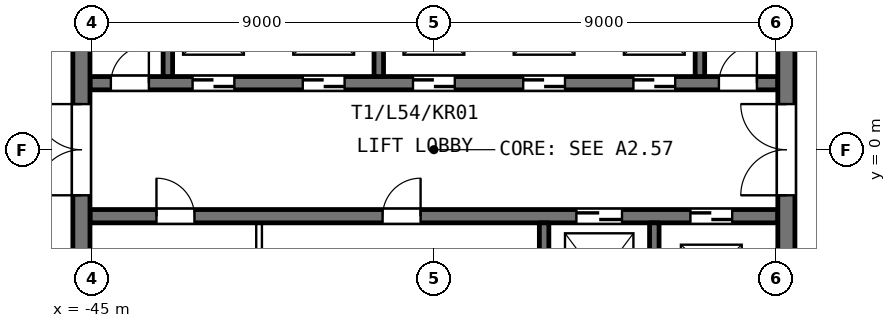
"""IFC4 building model, lengths in metres.
Left out: names, types, materials, properties, quantities, classifications, styles, units other than length and angle.
Written with IfcOpenShell. Run it as: python <this file> out.ifc"""

import sys

from ifc_helpers import new_model, si_unit, direction, frame, frame_2d, origin, place, context, subcontext, project, spatial, rectangle, extrude, element, fill, save


model = new_model("IFC4")
c1 = context("Model", 3, precision=1e-05, world=origin(), true_north=direction((0.0, 1.0)))
c2 = subcontext(c1, "Body", "Model", "MODEL_VIEW")
j1 = project(units=[si_unit("LENGTHUNIT", "METRE"), si_unit("PLANEANGLEUNIT", "RADIAN")], contexts=[c1])
p1 = place(None, origin())
s1 = spatial("IfcSite", under=j1, at=p1, CompositionType="ELEMENT")
p2 = place(p1, origin())
s2 = spatial("IfcBuilding", under=s1, at=p2, CompositionType="ELEMENT")
p3 = place(p2, frame((0.0, 0.0, 228.9)))
s3 = spatial("IfcBuildingStorey", under=s2, at=p3, CompositionType="ELEMENT", Elevation=228.9)
p4 = place(p3, frame((-45.05, -1.75, 0.0), z_axis=(0.0, 0.0, 1.0), x_axis=(1.0, 0.0, 0.0)))
e1 = element("IfcWall", 1, at=p4, inside=s3, PredefinedType="SHEAR", context=c2, shape_type="SweptSolid", body=[
    extrude(rectangle(XDim=18.1, YDim=0.35, at=frame_2d((9.05, 0.0))), origin(), (0.0, 0.0, 1.0), 3.6),
])
p5 = place(p4, frame((12.8, 0.0, 0.0)))
e2 = element("IfcOpeningElement", 2, at=p5, cuts=e1, PredefinedType="OPENING", context=c2, shape_type="SweptSolid", body=[
    extrude(rectangle(XDim=1.2, YDim=2.1, at=frame_2d((0.6, 1.05))), frame((0.0, 0.185, 0.0), z_axis=(0.0, -1.0, 0.0), x_axis=(1.0, 0.0, 0.0)), (0.0, 0.0, 1.0), 0.37),
])
p6 = place(p4, frame((15.8, 0.0, 0.0)))
e3 = element("IfcOpeningElement", 3, at=p6, cuts=e1, PredefinedType="OPENING", context=c2, shape_type="SweptSolid", body=[
    extrude(rectangle(XDim=1.1, YDim=2.1, at=frame_2d((0.55, 1.05))), frame((0.0, 0.185, 0.0), z_axis=(0.0, -1.0, 0.0), x_axis=(1.0, 0.0, 0.0)), (0.0, 0.0, 1.0), 0.37),
])
p7 = place(p4, frame((1.75, 0.0, 0.0)))
e4 = element("IfcOpeningElement", 4, at=p7, cuts=e1, PredefinedType="OPENING", context=c2, shape_type="SweptSolid", body=[
    extrude(rectangle(XDim=1.0, YDim=2.1, at=frame_2d((0.5, 1.05))), frame((0.0, 0.185, 0.0), z_axis=(0.0, -1.0, 0.0), x_axis=(1.0, 0.0, 0.0)), (0.0, 0.0, 1.0), 0.37),
])
p8 = place(p4, frame((7.7, 0.0, 0.0)))
e5 = element("IfcOpeningElement", 5, at=p8, cuts=e1, PredefinedType="OPENING", context=c2, shape_type="SweptSolid", body=[
    extrude(rectangle(XDim=1.0, YDim=2.1, at=frame_2d((0.5, 1.05))), frame((0.0, 0.185, 0.0), z_axis=(0.0, -1.0, 0.0), x_axis=(1.0, 0.0, 0.0)), (0.0, 0.0, 1.0), 0.37),
])
p9 = place(p3, frame((-45.05, 1.75, 0.0), z_axis=(0.0, 0.0, 1.0), x_axis=(1.0, 0.0, 0.0)))
e6 = element("IfcWall", 6, at=p9, inside=s3, PredefinedType="SHEAR", context=c2, shape_type="SweptSolid", body=[
    extrude(rectangle(XDim=18.1, YDim=0.35, at=frame_2d((9.05, 0.0))), origin(), (0.0, 0.0, 1.0), 3.6),
])
p10 = place(p9, frame((0.55, 0.0, 0.0)))
e7 = element("IfcOpeningElement", 7, at=p10, cuts=e6, PredefinedType="OPENING", context=c2, shape_type="SweptSolid", body=[
    extrude(rectangle(XDim=1.0, YDim=2.1, at=frame_2d((0.5, 1.05))), frame((0.0, 0.185, 0.0), z_axis=(0.0, -1.0, 0.0), x_axis=(1.0, 0.0, 0.0)), (0.0, 0.0, 1.0), 0.37),
])
p11 = place(p9, frame((2.7, 0.0, 0.0)))
e8 = element("IfcOpeningElement", 8, at=p11, cuts=e6, PredefinedType="OPENING", context=c2, shape_type="SweptSolid", body=[
    extrude(rectangle(XDim=1.1, YDim=2.1, at=frame_2d((0.55, 1.05))), frame((0.0, 0.185, 0.0), z_axis=(0.0, -1.0, 0.0), x_axis=(1.0, 0.0, 0.0)), (0.0, 0.0, 1.0), 0.37),
])
p12 = place(p9, frame((5.6, 0.0, 0.0)))
e9 = element("IfcOpeningElement", 9, at=p12, cuts=e6, PredefinedType="OPENING", context=c2, shape_type="SweptSolid", body=[
    extrude(rectangle(XDim=1.1, YDim=2.1, at=frame_2d((0.55, 1.05))), frame((0.0, 0.185, 0.0), z_axis=(0.0, -1.0, 0.0), x_axis=(1.0, 0.0, 0.0)), (0.0, 0.0, 1.0), 0.37),
])
p13 = place(p9, frame((8.5, 0.0, 0.0)))
e10 = element("IfcOpeningElement", 10, at=p13, cuts=e6, PredefinedType="OPENING", context=c2, shape_type="SweptSolid", body=[
    extrude(rectangle(XDim=1.1, YDim=2.1, at=frame_2d((0.55, 1.05))), frame((0.0, 0.185, 0.0), z_axis=(0.0, -1.0, 0.0), x_axis=(1.0, 0.0, 0.0)), (0.0, 0.0, 1.0), 0.37),
])
p14 = place(p9, frame((11.4, 0.0, 0.0)))
e11 = element("IfcOpeningElement", 11, at=p14, cuts=e6, PredefinedType="OPENING", context=c2, shape_type="SweptSolid", body=[
    extrude(rectangle(XDim=1.1, YDim=2.1, at=frame_2d((0.55, 1.05))), frame((0.0, 0.185, 0.0), z_axis=(0.0, -1.0, 0.0), x_axis=(1.0, 0.0, 0.0)), (0.0, 0.0, 1.0), 0.37),
])
p15 = place(p9, frame((14.3, 0.0, 0.0)))
e12 = element("IfcOpeningElement", 12, at=p15, cuts=e6, PredefinedType="OPENING", context=c2, shape_type="SweptSolid", body=[
    extrude(rectangle(XDim=1.1, YDim=2.1, at=frame_2d((0.55, 1.05))), frame((0.0, 0.185, 0.0), z_axis=(0.0, -1.0, 0.0), x_axis=(1.0, 0.0, 0.0)), (0.0, 0.0, 1.0), 0.37),
])
p16 = place(p9, frame((16.55, 0.0, 0.0)))
e13 = element("IfcOpeningElement", 13, at=p16, cuts=e6, PredefinedType="OPENING", context=c2, shape_type="SweptSolid", body=[
    extrude(rectangle(XDim=1.0, YDim=2.1, at=frame_2d((0.5, 1.05))), frame((0.0, 0.185, 0.0), z_axis=(0.0, -1.0, 0.0), x_axis=(1.0, 0.0, 0.0)), (0.0, 0.0, 1.0), 0.37),
])
p17 = place(p3, frame((-45.275, -9.5, 0.0), z_axis=(0.0, 0.0, 1.0), x_axis=(0.0, 1.0, 0.0)))
e14 = element("IfcWall", 14, at=p17, inside=s3, PredefinedType="SHEAR", context=c2, shape_type="SweptSolid", body=[
    extrude(rectangle(XDim=19.0, YDim=0.45, at=frame_2d((9.5, 0.0))), origin(), (0.0, 0.0, 1.0), 3.6),
])
p18 = place(p17, frame((8.3, 0.0, 0.0)))
e15 = element("IfcOpeningElement", 15, at=p18, cuts=e14, PredefinedType="OPENING", context=c2, shape_type="SweptSolid", body=[
    extrude(rectangle(XDim=2.4, YDim=2.1, at=frame_2d((1.2, 1.05))), frame((0.0, 0.235, 0.0), z_axis=(0.0, -1.0, 0.0), x_axis=(1.0, 0.0, 0.0)), (0.0, 0.0, 1.0), 0.47),
])
p19 = place(p3, frame((-43.0, 1.925, 0.0), z_axis=(0.0, 0.0, 1.0), x_axis=(0.0, 1.0, 0.0)))
e16 = element("IfcWall", 16, at=p19, inside=s3, PredefinedType="SHEAR", context=c2, shape_type="SweptSolid", body=[
    extrude(rectangle(XDim=2.7, YDim=0.25, at=frame_2d((1.35, 0.0))), origin(), (0.0, 0.0, 1.0), 3.6),
])
p20 = place(p3, frame((-40.6, -4.625, 0.0), z_axis=(0.0, 0.0, 1.0), x_axis=(0.0, 1.0, 0.0)))
e17 = element("IfcWall", 17, at=p20, inside=s3, PredefinedType="PARTITIONING", context=c2, shape_type="SweptSolid", body=[
    extrude(rectangle(XDim=2.7, YDim=0.15, at=frame_2d((1.35, 0.0))), origin(), (0.0, 0.0, 1.0), 3.6),
])
for number, where, z_axis, x_axis in (
    (18, (-37.45, 1.925, 0.0), (0.0, 0.0, 1.0), (0.0, 1.0, 0.0)),
    (19, (-33.1, -4.625, 0.0), (0.0, 0.0, 1.0), (0.0, 1.0, 0.0)),
    (20, (-30.2, -4.625, 0.0), (0.0, 0.0, 1.0), (0.0, 1.0, 0.0)),
):
    element("IfcWall", number, at=place(p3, frame(where, z_axis=z_axis, x_axis=x_axis)), inside=s3, PredefinedType="SHEAR", context=c2, shape_type="SweptSolid", body=[
        extrude(rectangle(XDim=2.7, YDim=0.25, at=frame_2d((1.35, 0.0))), origin(), (0.0, 0.0, 1.0), 3.6),
    ])
p21 = place(p3, frame((-29.0, 1.925, 0.0), z_axis=(0.0, 0.0, 1.0), x_axis=(0.0, 1.0, 0.0)))
e21 = element("IfcWall", 21, at=p21, inside=s3, PredefinedType="SHEAR", context=c2, shape_type="SweptSolid", body=[
    extrude(rectangle(XDim=2.95, YDim=0.25, at=frame_2d((1.475, 0.0))), origin(), (0.0, 0.0, 1.0), 3.6),
])
p22 = place(p3, frame((-26.725, -9.5, 0.0), z_axis=(0.0, 0.0, 1.0), x_axis=(0.0, 1.0, 0.0)))
e22 = element("IfcWall", 22, at=p22, inside=s3, PredefinedType="SHEAR", context=c2, shape_type="SweptSolid", body=[
    extrude(rectangle(XDim=19.0, YDim=0.45, at=frame_2d((9.5, 0.0))), origin(), (0.0, 0.0, 1.0), 3.6),
])
p23 = place(p22, frame((8.3, 0.0, 0.0)))
e23 = element("IfcOpeningElement", 23, at=p23, cuts=e22, PredefinedType="OPENING", context=c2, shape_type="SweptSolid", body=[
    extrude(rectangle(XDim=2.4, YDim=2.1, at=frame_2d((1.2, 1.05))), frame((0.0, 0.235, 0.0), z_axis=(0.0, -1.0, 0.0), x_axis=(1.0, 0.0, 0.0)), (0.0, 0.0, 1.0), 0.47),
])
p24 = place(p18, origin())
e24 = element("IfcDoor", 24, at=p24, inside=s3, OperationType="DOUBLE_DOOR_SINGLE_SWING", PredefinedType="DOOR", context=c2, shape_type="SweptSolid", body=[
    extrude(rectangle(XDim=2.4, YDim=2.1, at=frame_2d((1.2, 1.05))), frame((0.0, 0.025, 0.0), z_axis=(0.0, -1.0, 0.0), x_axis=(1.0, 0.0, 0.0)), (0.0, 0.0, 1.0), 0.05),
])
fill(e15, e24)
p25 = place(p23, origin())
e25 = element("IfcDoor", 25, at=p25, inside=s3, OperationType="DOUBLE_DOOR_SINGLE_SWING", PredefinedType="DOOR", context=c2, shape_type="SweptSolid", body=[
    extrude(rectangle(XDim=2.4, YDim=2.1, at=frame_2d((1.2, 1.05))), frame((0.0, 0.025, 0.0), z_axis=(0.0, -1.0, 0.0), x_axis=(1.0, 0.0, 0.0)), (0.0, 0.0, 1.0), 0.05),
])
fill(e23, e25)
p26 = place(p10, origin())
e26 = element("IfcDoor", 26, at=p26, inside=s3, OperationType="SINGLE_SWING_RIGHT", PredefinedType="DOOR", context=c2, shape_type="SweptSolid", body=[
    extrude(rectangle(XDim=1.0, YDim=2.1, at=frame_2d((0.5, 1.05))), frame((0.0, 0.025, 0.0), z_axis=(0.0, -1.0, 0.0), x_axis=(1.0, 0.0, 0.0)), (0.0, 0.0, 1.0), 0.05),
])
fill(e7, e26)
p27 = place(p11, origin())
e27 = element("IfcDoor", 27, at=p27, inside=s3, OperationType="SLIDING_TO_LEFT", PredefinedType="DOOR", context=c2, shape_type="SweptSolid", body=[
    extrude(rectangle(XDim=1.1, YDim=2.1, at=frame_2d((0.55, 1.05))), frame((0.0, 0.025, 0.0), z_axis=(0.0, -1.0, 0.0), x_axis=(1.0, 0.0, 0.0)), (0.0, 0.0, 1.0), 0.05),
])
fill(e8, e27)
p28 = place(p12, origin())
e28 = element("IfcDoor", 28, at=p28, inside=s3, OperationType="SLIDING_TO_LEFT", PredefinedType="DOOR", context=c2, shape_type="SweptSolid", body=[
    extrude(rectangle(XDim=1.1, YDim=2.1, at=frame_2d((0.55, 1.05))), frame((0.0, 0.025, 0.0), z_axis=(0.0, -1.0, 0.0), x_axis=(1.0, 0.0, 0.0)), (0.0, 0.0, 1.0), 0.05),
])
fill(e9, e28)
p29 = place(p13, origin())
e29 = element("IfcDoor", 29, at=p29, inside=s3, OperationType="SLIDING_TO_LEFT", PredefinedType="DOOR", context=c2, shape_type="SweptSolid", body=[
    extrude(rectangle(XDim=1.1, YDim=2.1, at=frame_2d((0.55, 1.05))), frame((0.0, 0.025, 0.0), z_axis=(0.0, -1.0, 0.0), x_axis=(1.0, 0.0, 0.0)), (0.0, 0.0, 1.0), 0.05),
])
fill(e10, e29)
p30 = place(p14, origin())
e30 = element("IfcDoor", 30, at=p30, inside=s3, OperationType="SLIDING_TO_LEFT", PredefinedType="DOOR", context=c2, shape_type="SweptSolid", body=[
    extrude(rectangle(XDim=1.1, YDim=2.1, at=frame_2d((0.55, 1.05))), frame((0.0, 0.025, 0.0), z_axis=(0.0, -1.0, 0.0), x_axis=(1.0, 0.0, 0.0)), (0.0, 0.0, 1.0), 0.05),
])
fill(e11, e30)
p31 = place(p15, origin())
e31 = element("IfcDoor", 31, at=p31, inside=s3, OperationType="SLIDING_TO_LEFT", PredefinedType="DOOR", context=c2, shape_type="SweptSolid", body=[
    extrude(rectangle(XDim=1.1, YDim=2.1, at=frame_2d((0.55, 1.05))), frame((0.0, 0.025, 0.0), z_axis=(0.0, -1.0, 0.0), x_axis=(1.0, 0.0, 0.0)), (0.0, 0.0, 1.0), 0.05),
])
fill(e12, e31)
p32 = place(p16, origin())
e32 = element("IfcDoor", 32, at=p32, inside=s3, OperationType="SINGLE_SWING_RIGHT", PredefinedType="DOOR", context=c2, shape_type="SweptSolid", body=[
    extrude(rectangle(XDim=1.0, YDim=2.1, at=frame_2d((0.5, 1.05))), frame((0.0, 0.025, 0.0), z_axis=(0.0, -1.0, 0.0), x_axis=(1.0, 0.0, 0.0)), (0.0, 0.0, 1.0), 0.05),
])
fill(e13, e32)
p33 = place(p5, origin())
e33 = element("IfcDoor", 33, at=p33, inside=s3, OperationType="SLIDING_TO_LEFT", PredefinedType="DOOR", context=c2, shape_type="SweptSolid", body=[
    extrude(rectangle(XDim=1.2, YDim=2.1, at=frame_2d((0.6, 1.05))), frame((0.0, 0.025, 0.0), z_axis=(0.0, -1.0, 0.0), x_axis=(1.0, 0.0, 0.0)), (0.0, 0.0, 1.0), 0.05),
])
fill(e2, e33)
p34 = place(p6, origin())
e34 = element("IfcDoor", 34, at=p34, inside=s3, OperationType="SLIDING_TO_LEFT", PredefinedType="DOOR", context=c2, shape_type="SweptSolid", body=[
    extrude(rectangle(XDim=1.1, YDim=2.1, at=frame_2d((0.55, 1.05))), frame((0.0, 0.025, 0.0), z_axis=(0.0, -1.0, 0.0), x_axis=(1.0, 0.0, 0.0)), (0.0, 0.0, 1.0), 0.05),
])
fill(e3, e34)
p35 = place(p7, origin())
e35 = element("IfcDoor", 35, at=p35, inside=s3, OperationType="SINGLE_SWING_LEFT", PredefinedType="DOOR", context=c2, shape_type="SweptSolid", body=[
    extrude(rectangle(XDim=1.0, YDim=2.1, at=frame_2d((0.5, 1.05))), frame((0.0, 0.025, 0.0), z_axis=(0.0, -1.0, 0.0), x_axis=(1.0, 0.0, 0.0)), (0.0, 0.0, 1.0), 0.05),
])
fill(e4, e35)
p36 = place(p8, origin())
e36 = element("IfcDoor", 36, at=p36, inside=s3, OperationType="SINGLE_SWING_RIGHT", PredefinedType="DOOR", context=c2, shape_type="SweptSolid", body=[
    extrude(rectangle(XDim=1.0, YDim=2.1, at=frame_2d((0.5, 1.05))), frame((0.0, 0.025, 0.0), z_axis=(0.0, -1.0, 0.0), x_axis=(1.0, 0.0, 0.0)), (0.0, 0.0, 1.0), 0.05),
])
fill(e5, e36)
save(model, sys.argv[1])
